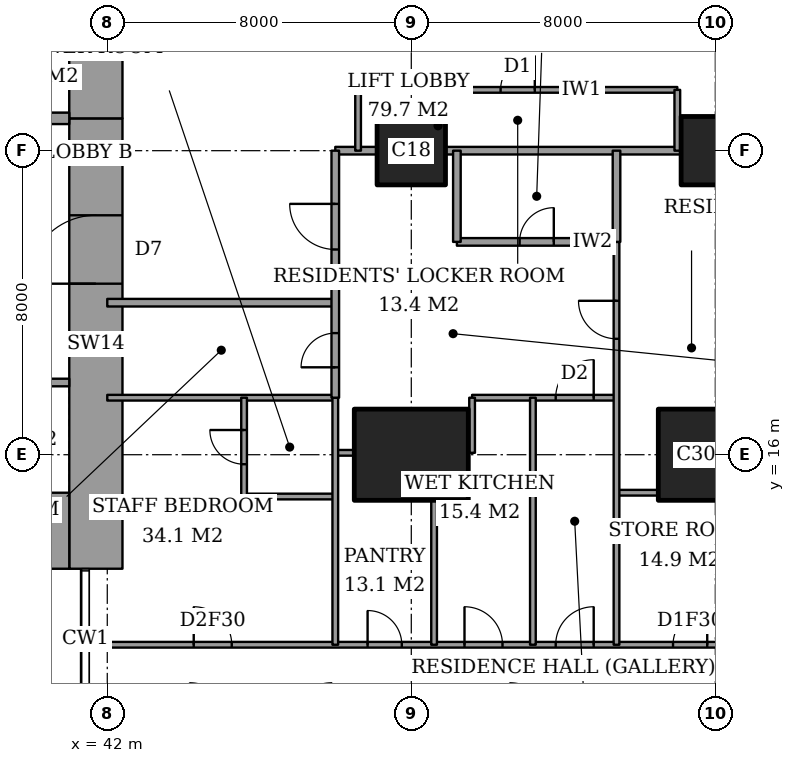
"""IFC4 building model, lengths in metres.
Left out: names, types, materials, properties, quantities, classifications, styles, units other than length and angle.
Written with IfcOpenShell. Run it as: python <this file> out.ifc"""

import sys

from ifc_helpers import new_model, si_unit, direction, frame, frame_2d, origin, origin_2d, place, context, subcontext, project, spatial, rectangle, extrude, element, fill, save


model = new_model("IFC4")
c1 = context("Model", 3, precision=1e-05, world=origin(), true_north=direction((0.0, 1.0)))
c2 = subcontext(c1, "Body", "Model", "MODEL_VIEW")
j1 = project(units=[si_unit("LENGTHUNIT", "METRE"), si_unit("PLANEANGLEUNIT", "RADIAN")], contexts=[c1])
p1 = place(None, origin())
s1 = spatial("IfcSite", under=j1, at=p1, CompositionType="ELEMENT")
p2 = place(p1, origin())
s2 = spatial("IfcBuilding", under=s1, at=p2, CompositionType="ELEMENT")
p3 = place(p2, frame((0.0, 0.0, 218.2)))
s3 = spatial("IfcBuildingStorey", under=s2, at=p3, CompositionType="ELEMENT", Elevation=218.2)
p4 = place(p3, frame((50.0, 16.0, 0.0), z_axis=(0.0, 0.0, 1.0), x_axis=(1.0, 0.0, 0.0)))
e1 = element("IfcColumn", 1, at=p4, inside=s3, PredefinedType="COLUMN", context=c2, shape_type="SweptSolid", body=[
    extrude(rectangle(XDim=3.0, YDim=2.4, at=origin_2d()), origin(), (0.0, 0.0, 1.0), 3.6),
])
p5 = place(p3, frame((50.0, 24.0, 0.0), z_axis=(0.0, 0.0, 1.0), x_axis=(1.0, 0.0, 0.0)))
e2 = element("IfcColumn", 2, at=p5, inside=s3, PredefinedType="COLUMN", context=c2, shape_type="SweptSolid", body=[
    extrude(rectangle(XDim=1.8, YDim=1.8, at=origin_2d()), origin(), (0.0, 0.0, 1.0), 3.6),
])
p6 = place(p3, frame((58.0, 16.0, 0.0), z_axis=(0.0, 0.0, 1.0), x_axis=(1.0, 0.0, 0.0)))
e3 = element("IfcColumn", 3, at=p6, inside=s3, PredefinedType="COLUMN", context=c2, shape_type="SweptSolid", body=[
    extrude(rectangle(XDim=3.0, YDim=2.4, at=origin_2d()), origin(), (0.0, 0.0, 1.0), 3.6),
])
p7 = place(p3, frame((58.0, 24.0, 0.0), z_axis=(0.0, 0.0, 1.0), x_axis=(1.0, 0.0, 0.0)))
e4 = element("IfcColumn", 4, at=p7, inside=s3, PredefinedType="COLUMN", context=c2, shape_type="SweptSolid", body=[
    extrude(rectangle(XDim=1.8, YDim=1.8, at=origin_2d()), origin(), (0.0, 0.0, 1.0), 3.6),
])
p8 = place(p3, frame((37.85, 14.0, 0.0), z_axis=(0.0, 0.0, 1.0), x_axis=(1.0, 0.0, 0.0)))
e5 = element("IfcWall", 5, at=p8, inside=s3, PredefinedType="SHEAR", context=c2, shape_type="SweptSolid", body=[
    extrude(rectangle(XDim=3.15, YDim=2.0, at=frame_2d((1.575, 0.0))), origin(), (0.0, 0.0, 1.0), 3.6),
])
p9 = place(p3, frame((41.7, 13.0, 0.0), z_axis=(0.0, 0.0, 1.0), x_axis=(0.0, 1.0, 0.0)))
e6 = element("IfcWall", 6, at=p9, inside=s3, PredefinedType="SHEAR", context=c2, shape_type="SweptSolid", body=[
    extrude(rectangle(XDim=11.85, YDim=1.4, at=frame_2d((5.925, 0.0))), origin(), (0.0, 0.0, 1.0), 3.6),
])
p10 = place(p9, frame((7.5, 0.0, 0.0)))
e7 = element("IfcOpeningElement", 7, at=p10, cuts=e6, PredefinedType="OPENING", context=c2, shape_type="SweptSolid", body=[
    extrude(rectangle(XDim=1.8, YDim=2.4, at=frame_2d((0.9, 1.2))), frame((0.0, 0.71, 0.0), z_axis=(0.0, -1.0, 0.0), x_axis=(1.0, 0.0, 0.0)), (0.0, 0.0, 1.0), 1.42),
])
p11 = place(p3, frame((41.7, 24.85, 0.0), z_axis=(0.0, 0.0, 1.0), x_axis=(0.0, 1.0, 0.0)))
e8 = element("IfcWall", 8, at=p11, inside=s3, PredefinedType="SHEAR", context=c2, shape_type="SweptSolid", body=[
    extrude(rectangle(XDim=10.15, YDim=1.4, at=frame_2d((5.075, 0.0))), origin(), (0.0, 0.0, 1.0), 3.6),
])
p12 = place(p3, frame((37.85, 24.85, 0.0), z_axis=(0.0, 0.0, 1.0), x_axis=(1.0, 0.0, 0.0)))
e9 = element("IfcWall", 9, at=p12, inside=s3, PredefinedType="SHEAR", context=c2, shape_type="SweptSolid", body=[
    extrude(rectangle(XDim=3.15, YDim=0.3, at=frame_2d((1.575, 0.0))), origin(), (0.0, 0.0, 1.0), 3.6),
])
p13 = place(p12, frame((0.65, 0.0, 0.0)))
e10 = element("IfcOpeningElement", 10, at=p13, cuts=e9, PredefinedType="OPENING", context=c2, shape_type="SweptSolid", body=[
    extrude(rectangle(XDim=1.6, YDim=2.1, at=frame_2d((0.8, 1.05))), frame((0.0, 0.16, 0.0), z_axis=(0.0, -1.0, 0.0), x_axis=(1.0, 0.0, 0.0)), (0.0, 0.0, 1.0), 0.32),
])
p14 = place(p3, frame((41.439, 11.0, 0.0), z_axis=(0.0, 0.0, 1.0), x_axis=(1.0, 0.0, 0.0)))
e11 = element("IfcWall", 11, at=p14, inside=s3, PredefinedType="PARTITIONING", context=c2, shape_type="SweptSolid", body=[
    extrude(rectangle(XDim=25.011, YDim=0.15, at=frame_2d((12.505, 0.0))), origin(), (0.0, 0.0, 1.0), 3.35),
])
p15 = place(p14, frame((12.361, 0.0, 0.0)))
e12 = element("IfcOpeningElement", 12, at=p15, cuts=e11, PredefinedType="OPENING", context=c2, shape_type="SweptSolid", body=[
    extrude(rectangle(XDim=1.0, YDim=2.1, at=frame_2d((0.5, 1.05))), frame((0.0, 0.085, 0.0), z_axis=(0.0, -1.0, 0.0), x_axis=(1.0, 0.0, 0.0)), (0.0, 0.0, 1.0), 0.17),
])
p16 = place(p14, frame((20.924, 0.0, 0.0)))
e13 = element("IfcOpeningElement", 13, at=p16, cuts=e11, PredefinedType="OPENING", context=c2, shape_type="SweptSolid", body=[
    extrude(rectangle(XDim=1.0, YDim=2.1, at=frame_2d((0.5, 1.05))), frame((0.0, 0.085, 0.0), z_axis=(0.0, -1.0, 0.0), x_axis=(1.0, 0.0, 0.0)), (0.0, 0.0, 1.0), 0.17),
])
p17 = place(p14, frame((15.448, 0.0, 0.0)))
e14 = element("IfcOpeningElement", 14, at=p17, cuts=e11, PredefinedType="OPENING", context=c2, shape_type="SweptSolid", body=[
    extrude(rectangle(XDim=0.9, YDim=2.1, at=frame_2d((0.45, 1.05))), frame((0.0, 0.085, 0.0), z_axis=(0.0, -1.0, 0.0), x_axis=(1.0, 0.0, 0.0)), (0.0, 0.0, 1.0), 0.17),
])
p18 = place(p14, frame((9.961, 0.0, 0.0)))
e15 = element("IfcOpeningElement", 15, at=p18, cuts=e11, PredefinedType="OPENING", context=c2, shape_type="SweptSolid", body=[
    extrude(rectangle(XDim=1.0, YDim=2.1, at=frame_2d((0.5, 1.05))), frame((0.0, 0.085, 0.0), z_axis=(0.0, -1.0, 0.0), x_axis=(1.0, 0.0, 0.0)), (0.0, 0.0, 1.0), 0.17),
])
p19 = place(p14, frame((7.411, 0.0, 0.0)))
e16 = element("IfcOpeningElement", 16, at=p19, cuts=e11, PredefinedType="OPENING", context=c2, shape_type="SweptSolid", body=[
    extrude(rectangle(XDim=0.9, YDim=2.1, at=frame_2d((0.45, 1.05))), frame((0.0, 0.085, 0.0), z_axis=(0.0, -1.0, 0.0), x_axis=(1.0, 0.0, 0.0)), (0.0, 0.0, 1.0), 0.17),
])
p20 = place(p14, frame((2.836, 0.0, 0.0)))
e17 = element("IfcOpeningElement", 17, at=p20, cuts=e11, PredefinedType="OPENING", context=c2, shape_type="SweptSolid", body=[
    extrude(rectangle(XDim=1.0, YDim=2.1, at=frame_2d((0.5, 1.05))), frame((0.0, 0.085, 0.0), z_axis=(0.0, -1.0, 0.0), x_axis=(1.0, 0.0, 0.0)), (0.0, 0.0, 1.0), 0.17),
])
p21 = place(p3, frame((45.6, 14.9, 0.0), z_axis=(0.0, 0.0, 1.0), x_axis=(1.0, 0.0, 0.0)))
e18 = element("IfcWall", 18, at=p21, inside=s3, PredefinedType="PARTITIONING", context=c2, shape_type="SweptSolid", body=[
    extrude(rectangle(XDim=2.4, YDim=0.15, at=frame_2d((1.2, 0.0))), origin(), (0.0, 0.0, 1.0), 3.35),
])
p22 = place(p3, frame((55.4, 15.0, 0.0), z_axis=(0.0, 0.0, 1.0), x_axis=(1.0, 0.0, 0.0)))
e19 = element("IfcWall", 19, at=p22, inside=s3, PredefinedType="PARTITIONING", context=c2, shape_type="SweptSolid", body=[
    extrude(rectangle(XDim=1.1, YDim=0.15, at=frame_2d((0.55, 0.0))), origin(), (0.0, 0.0, 1.0), 3.35),
])
p23 = place(p3, frame((48.0, 16.05, 0.0), z_axis=(0.0, 0.0, 1.0), x_axis=(1.0, 0.0, 0.0)))
e20 = element("IfcWall", 20, at=p23, inside=s3, PredefinedType="PARTITIONING", context=c2, shape_type="SweptSolid", body=[
    extrude(rectangle(XDim=0.5, YDim=0.15, at=frame_2d((0.25, 0.0))), origin(), (0.0, 0.0, 1.0), 2.634),
])
p24 = place(p3, frame((42.0, 17.5, 0.0), z_axis=(0.0, 0.0, 1.0), x_axis=(1.0, 0.0, 0.0)))
e21 = element("IfcWall", 21, at=p24, inside=s3, PredefinedType="PARTITIONING", context=c2, shape_type="SweptSolid", body=[
    extrude(rectangle(XDim=6.0, YDim=0.15, at=frame_2d((3.0, 0.0))), origin(), (0.0, 0.0, 1.0), 3.35),
])
p25 = place(p3, frame((51.6, 17.5, 0.0), z_axis=(0.0, 0.0, 1.0), x_axis=(1.0, 0.0, 0.0)))
e22 = element("IfcWall", 22, at=p25, inside=s3, PredefinedType="PARTITIONING", context=c2, shape_type="SweptSolid", body=[
    extrude(rectangle(XDim=3.8, YDim=0.15, at=frame_2d((1.9, 0.0))), origin(), (0.0, 0.0, 1.0), 3.35),
])
p26 = place(p25, frame((2.2, 0.0, 0.0)))
e23 = element("IfcOpeningElement", 23, at=p26, cuts=e22, PredefinedType="OPENING", context=c2, shape_type="SweptSolid", body=[
    extrude(rectangle(XDim=1.0, YDim=2.1, at=frame_2d((0.5, 1.05))), frame((0.0, 0.085, 0.0), z_axis=(0.0, -1.0, 0.0), x_axis=(1.0, 0.0, 0.0)), (0.0, 0.0, 1.0), 0.17),
])
p27 = place(p3, frame((42.0, 20.0, 0.0), z_axis=(0.0, 0.0, 1.0), x_axis=(1.0, 0.0, 0.0)))
e24 = element("IfcWall", 24, at=p27, inside=s3, PredefinedType="PARTITIONING", context=c2, shape_type="SweptSolid", body=[
    extrude(rectangle(XDim=6.0, YDim=0.2, at=frame_2d((3.0, 0.0))), origin(), (0.0, 0.0, 1.0), 3.35),
])
p28 = place(p3, frame((51.2, 21.6, 0.0), z_axis=(0.0, 0.0, 1.0), x_axis=(1.0, 0.0, 0.0)))
e25 = element("IfcWall", 25, at=p28, inside=s3, PredefinedType="PARTITIONING", context=c2, shape_type="SweptSolid", body=[
    extrude(rectangle(XDim=4.2, YDim=0.2, at=frame_2d((2.1, 0.0))), origin(), (0.0, 0.0, 1.0), 3.35),
])
p29 = place(p28, frame((1.65, 0.0, 0.0)))
e26 = element("IfcOpeningElement", 26, at=p29, cuts=e25, PredefinedType="OPENING", context=c2, shape_type="SweptSolid", body=[
    extrude(rectangle(XDim=0.9, YDim=2.1, at=frame_2d((0.45, 1.05))), frame((0.0, 0.11, 0.0), z_axis=(0.0, -1.0, 0.0), x_axis=(1.0, 0.0, 0.0)), (0.0, 0.0, 1.0), 0.22),
])
p30 = place(p3, frame((48.0, 24.0, 0.0), z_axis=(0.0, 0.0, 1.0), x_axis=(1.0, 0.0, 0.0)))
e27 = element("IfcWall", 27, at=p30, inside=s3, PredefinedType="PARTITIONING", context=c2, shape_type="SweptSolid", body=[
    extrude(rectangle(XDim=1.1, YDim=0.2, at=frame_2d((0.55, 0.0))), origin(), (0.0, 0.0, 1.0), 3.35),
])
p31 = place(p3, frame((50.9, 24.0, 0.0), z_axis=(0.0, 0.0, 1.0), x_axis=(1.0, 0.0, 0.0)))
e28 = element("IfcWall", 28, at=p31, inside=s3, PredefinedType="PARTITIONING", context=c2, shape_type="SweptSolid", body=[
    extrude(rectangle(XDim=6.2, YDim=0.2, at=frame_2d((3.1, 0.0))), origin(), (0.0, 0.0, 1.0), 3.35),
])
p32 = place(p3, frame((48.6, 25.6, 0.0), z_axis=(0.0, 0.0, 1.0), x_axis=(1.0, 0.0, 0.0)))
e29 = element("IfcWall", 29, at=p32, inside=s3, PredefinedType="PARTITIONING", context=c2, shape_type="SweptSolid", body=[
    extrude(rectangle(XDim=8.4, YDim=0.15, at=frame_2d((4.2, 0.0))), origin(), (0.0, 0.0, 1.0), 3.35),
])
p33 = place(p32, frame((3.75, 0.0, 0.0)))
e30 = element("IfcOpeningElement", 30, at=p33, cuts=e29, PredefinedType="OPENING", context=c2, shape_type="SweptSolid", body=[
    extrude(rectangle(XDim=0.9, YDim=2.1, at=frame_2d((0.45, 1.05))), frame((0.0, 0.085, 0.0), z_axis=(0.0, -1.0, 0.0), x_axis=(1.0, 0.0, 0.0)), (0.0, 0.0, 1.0), 0.17),
])
p34 = place(p3, frame((45.6, 14.9, 0.0), z_axis=(0.0, 0.0, 1.0), x_axis=(0.0, 1.0, 0.0)))
e31 = element("IfcWall", 31, at=p34, inside=s3, PredefinedType="PARTITIONING", context=c2, shape_type="SweptSolid", body=[
    extrude(rectangle(XDim=2.6, YDim=0.15, at=frame_2d((1.3, 0.0))), origin(), (0.0, 0.0, 1.0), 3.35),
])
p35 = place(p34, frame((0.85, 0.0, 0.0)))
e32 = element("IfcOpeningElement", 32, at=p35, cuts=e31, PredefinedType="OPENING", context=c2, shape_type="SweptSolid", body=[
    extrude(rectangle(XDim=0.9, YDim=2.1, at=frame_2d((0.45, 1.05))), frame((0.0, 0.085, 0.0), z_axis=(0.0, -1.0, 0.0), x_axis=(1.0, 0.0, 0.0)), (0.0, 0.0, 1.0), 0.17),
])
p36 = place(p3, frame((48.0, 17.5, 0.0), z_axis=(0.0, 0.0, 1.0), x_axis=(0.0, 1.0, 0.0)))
e33 = element("IfcWall", 33, at=p36, inside=s3, PredefinedType="PARTITIONING", context=c2, shape_type="SweptSolid", body=[
    extrude(rectangle(XDim=6.5, YDim=0.2, at=frame_2d((3.25, 0.0))), origin(), (0.0, 0.0, 1.0), 3.35),
])
p37 = place(p36, frame((3.9, 0.0, 0.0)))
e34 = element("IfcOpeningElement", 34, at=p37, cuts=e33, PredefinedType="OPENING", context=c2, shape_type="SweptSolid", body=[
    extrude(rectangle(XDim=1.2, YDim=2.4, at=frame_2d((0.6, 1.2))), frame((0.0, 0.11, 0.0), z_axis=(0.0, -1.0, 0.0), x_axis=(1.0, 0.0, 0.0)), (0.0, 0.0, 1.0), 0.22),
])
p38 = place(p36, frame((0.8, 0.0, 0.0)))
e35 = element("IfcOpeningElement", 35, at=p38, cuts=e33, PredefinedType="OPENING", context=c2, shape_type="SweptSolid", body=[
    extrude(rectangle(XDim=0.9, YDim=2.1, at=frame_2d((0.45, 1.05))), frame((0.0, 0.11, 0.0), z_axis=(0.0, -1.0, 0.0), x_axis=(1.0, 0.0, 0.0)), (0.0, 0.0, 1.0), 0.22),
])
p39 = place(p3, frame((48.0, 11.0, 0.0), z_axis=(0.0, 0.0, 1.0), x_axis=(0.0, 1.0, 0.0)))
e36 = element("IfcWall", 36, at=p39, inside=s3, PredefinedType="PARTITIONING", context=c2, shape_type="SweptSolid", body=[
    extrude(rectangle(XDim=6.5, YDim=0.15, at=frame_2d((3.25, 0.0))), origin(), (0.0, 0.0, 1.0), 3.35),
])
p40 = place(p3, frame((48.6, 24.0, 0.0), z_axis=(0.0, 0.0, 1.0), x_axis=(0.0, 1.0, 0.0)))
e37 = element("IfcWall", 37, at=p40, inside=s3, PredefinedType="PARTITIONING", context=c2, shape_type="SweptSolid", body=[
    extrude(rectangle(XDim=1.6, YDim=0.15, at=frame_2d((0.8, 0.0))), origin(), (0.0, 0.0, 1.0), 3.35),
])
p41 = place(p3, frame((50.6, 11.0, 0.0), z_axis=(0.0, 0.0, 1.0), x_axis=(0.0, 1.0, 0.0)))
e38 = element("IfcWall", 38, at=p41, inside=s3, PredefinedType="PARTITIONING", context=c2, shape_type="SweptSolid", body=[
    extrude(rectangle(XDim=3.8, YDim=0.15, at=frame_2d((1.9, 0.0))), origin(), (0.0, 0.0, 1.0), 3.35),
])
p42 = place(p3, frame((51.2, 21.6, 0.0), z_axis=(0.0, 0.0, 1.0), x_axis=(0.0, 1.0, 0.0)))
e39 = element("IfcWall", 39, at=p42, inside=s3, PredefinedType="PARTITIONING", context=c2, shape_type="SweptSolid", body=[
    extrude(rectangle(XDim=2.4, YDim=0.2, at=frame_2d((1.2, 0.0))), origin(), (0.0, 0.0, 1.0), 3.35),
])
p43 = place(p3, frame((51.6, 16.05, 0.0), z_axis=(0.0, 0.0, 1.0), x_axis=(0.0, 1.0, 0.0)))
e40 = element("IfcWall", 40, at=p43, inside=s3, PredefinedType="PARTITIONING", context=c2, shape_type="SweptSolid", body=[
    extrude(rectangle(XDim=1.45, YDim=0.15, at=frame_2d((0.725, 0.0))), origin(), (0.0, 0.0, 1.0), 3.35),
])
p44 = place(p3, frame((53.2, 11.0, 0.0), z_axis=(0.0, 0.0, 1.0), x_axis=(0.0, 1.0, 0.0)))
e41 = element("IfcWall", 41, at=p44, inside=s3, PredefinedType="PARTITIONING", context=c2, shape_type="SweptSolid", body=[
    extrude(rectangle(XDim=6.5, YDim=0.15, at=frame_2d((3.25, 0.0))), origin(), (0.0, 0.0, 1.0), 3.35),
])
p45 = place(p3, frame((55.4, 21.6, 0.0), z_axis=(0.0, 0.0, 1.0), x_axis=(0.0, 1.0, 0.0)))
e42 = element("IfcWall", 42, at=p45, inside=s3, PredefinedType="PARTITIONING", context=c2, shape_type="SweptSolid", body=[
    extrude(rectangle(XDim=2.4, YDim=0.2, at=frame_2d((1.2, 0.0))), origin(), (0.0, 0.0, 1.0), 3.35),
])
p46 = place(p3, frame((55.4, 11.0, 0.0), z_axis=(0.0, 0.0, 1.0), x_axis=(0.0, 1.0, 0.0)))
e43 = element("IfcWall", 43, at=p46, inside=s3, PredefinedType="PARTITIONING", context=c2, shape_type="SweptSolid", body=[
    extrude(rectangle(XDim=10.6, YDim=0.15, at=frame_2d((5.3, 0.0))), origin(), (0.0, 0.0, 1.0), 3.35),
])
p47 = place(p46, frame((8.05, 0.0, 0.0)))
e44 = element("IfcOpeningElement", 44, at=p47, cuts=e43, PredefinedType="OPENING", context=c2, shape_type="SweptSolid", body=[
    extrude(rectangle(XDim=1.0, YDim=2.1, at=frame_2d((0.5, 1.05))), frame((0.0, 0.085, 0.0), z_axis=(0.0, -1.0, 0.0), x_axis=(1.0, 0.0, 0.0)), (0.0, 0.0, 1.0), 0.17),
])
p48 = place(p3, frame((57.0, 24.0, 0.0), z_axis=(0.0, 0.0, 1.0), x_axis=(0.0, 1.0, 0.0)))
e45 = element("IfcWall", 45, at=p48, inside=s3, PredefinedType="PARTITIONING", context=c2, shape_type="SweptSolid", body=[
    extrude(rectangle(XDim=1.6, YDim=0.15, at=frame_2d((0.8, 0.0))), origin(), (0.0, 0.0, 1.0), 3.35),
])
p49 = place(p3, frame((28.3, 17.9, 0.0), z_axis=(0.0, 0.0, 1.0), x_axis=(1.0, 0.0, 0.0)))
e46 = element("IfcWall", 46, at=p49, inside=s3, PredefinedType="PARTITIONING", context=c2, shape_type="SweptSolid", body=[
    extrude(rectangle(XDim=12.7, YDim=0.2, at=frame_2d((6.35, 0.0))), origin(), (0.0, 0.0, 1.0), 3.6),
])
p50 = place(p49, frame((1.05, 0.0, 0.0)))
e47 = element("IfcOpeningElement", 47, at=p50, cuts=e46, PredefinedType="OPENING", context=c2, shape_type="SweptSolid", body=[
    extrude(rectangle(XDim=0.9, YDim=2.1, at=frame_2d((0.45, 1.05))), frame((0.0, 0.11, 0.0), z_axis=(0.0, -1.0, 0.0), x_axis=(1.0, 0.0, 0.0)), (0.0, 0.0, 1.0), 0.22),
])
p51 = place(p49, frame((7.45, 0.0, 0.0)))
e48 = element("IfcOpeningElement", 48, at=p51, cuts=e46, PredefinedType="OPENING", context=c2, shape_type="SweptSolid", body=[
    extrude(rectangle(XDim=0.9, YDim=2.1, at=frame_2d((0.45, 1.05))), frame((0.0, 0.11, 0.0), z_axis=(0.0, -1.0, 0.0), x_axis=(1.0, 0.0, 0.0)), (0.0, 0.0, 1.0), 0.22),
])
p52 = place(p49, frame((10.6, 0.0, 0.0)))
e49 = element("IfcOpeningElement", 49, at=p52, cuts=e46, PredefinedType="OPENING", context=c2, shape_type="SweptSolid", body=[
    extrude(rectangle(XDim=1.2, YDim=2.1, at=frame_2d((0.6, 1.05))), frame((0.0, 0.11, 0.0), z_axis=(0.0, -1.0, 0.0), x_axis=(1.0, 0.0, 0.0)), (0.0, 0.0, 1.0), 0.22),
])
p53 = place(p15, origin())
e50 = element("IfcDoor", 50, at=p53, inside=s3, OperationType="SINGLE_SWING_LEFT", PredefinedType="DOOR", context=c2, shape_type="SweptSolid", body=[
    extrude(rectangle(XDim=1.0, YDim=2.1, at=frame_2d((0.5, 1.05))), frame((0.0, 0.025, 0.0), z_axis=(0.0, -1.0, 0.0), x_axis=(1.0, 0.0, 0.0)), (0.0, 0.0, 1.0), 0.05),
])
fill(e12, e50)
p54 = place(p17, origin())
e51 = element("IfcDoor", 51, at=p54, inside=s3, OperationType="SINGLE_SWING_LEFT", PredefinedType="DOOR", context=c2, shape_type="SweptSolid", body=[
    extrude(rectangle(XDim=0.9, YDim=2.1, at=frame_2d((0.45, 1.05))), frame((0.0, 0.025, 0.0), z_axis=(0.0, -1.0, 0.0), x_axis=(1.0, 0.0, 0.0)), (0.0, 0.0, 1.0), 0.05),
])
fill(e14, e51)
p55 = place(p47, origin())
e52 = element("IfcDoor", 52, at=p55, inside=s3, OperationType="SINGLE_SWING_LEFT", PredefinedType="DOOR", context=c2, shape_type="SweptSolid", body=[
    extrude(rectangle(XDim=1.0, YDim=2.1, at=frame_2d((0.5, 1.05))), frame((0.0, 0.025, 0.0), z_axis=(0.0, -1.0, 0.0), x_axis=(1.0, 0.0, 0.0)), (0.0, 0.0, 1.0), 0.05),
])
fill(e44, e52)
p56 = place(p29, origin())
e53 = element("IfcDoor", 53, at=p56, inside=s3, OperationType="SINGLE_SWING_LEFT", PredefinedType="DOOR", context=c2, shape_type="SweptSolid", body=[
    extrude(rectangle(XDim=0.9, YDim=2.1, at=frame_2d((0.45, 1.05))), frame((0.0, 0.025, 0.0), z_axis=(0.0, -1.0, 0.0), x_axis=(1.0, 0.0, 0.0)), (0.0, 0.0, 1.0), 0.05),
])
fill(e26, e53)
p57 = place(p37, origin())
e54 = element("IfcDoor", 54, at=p57, inside=s3, OperationType="SINGLE_SWING_LEFT", PredefinedType="DOOR", context=c2, shape_type="SweptSolid", body=[
    extrude(rectangle(XDim=1.2, YDim=2.4, at=frame_2d((0.6, 1.2))), frame((0.0, 0.025, 0.0), z_axis=(0.0, -1.0, 0.0), x_axis=(1.0, 0.0, 0.0)), (0.0, 0.0, 1.0), 0.05),
])
fill(e34, e54)
p58 = place(p26, origin())
e55 = element("IfcDoor", 55, at=p58, inside=s3, OperationType="SINGLE_SWING_LEFT", PredefinedType="DOOR", context=c2, shape_type="SweptSolid", body=[
    extrude(rectangle(XDim=1.0, YDim=2.1, at=frame_2d((0.5, 1.05))), frame((0.0, 0.025, 0.0), z_axis=(0.0, -1.0, 0.0), x_axis=(1.0, 0.0, 0.0)), (0.0, 0.0, 1.0), 0.05),
])
fill(e23, e55)
p59 = place(p18, origin())
e56 = element("IfcDoor", 56, at=p59, inside=s3, OperationType="SINGLE_SWING_RIGHT", PredefinedType="DOOR", context=c2, shape_type="SweptSolid", body=[
    extrude(rectangle(XDim=1.0, YDim=2.1, at=frame_2d((0.5, 1.05))), frame((0.0, 0.025, 0.0), z_axis=(0.0, -1.0, 0.0), x_axis=(1.0, 0.0, 0.0)), (0.0, 0.0, 1.0), 0.05),
])
fill(e15, e56)
p60 = place(p19, origin())
e57 = element("IfcDoor", 57, at=p60, inside=s3, OperationType="SINGLE_SWING_RIGHT", PredefinedType="DOOR", context=c2, shape_type="SweptSolid", body=[
    extrude(rectangle(XDim=0.9, YDim=2.1, at=frame_2d((0.45, 1.05))), frame((0.0, 0.025, 0.0), z_axis=(0.0, -1.0, 0.0), x_axis=(1.0, 0.0, 0.0)), (0.0, 0.0, 1.0), 0.05),
])
fill(e16, e57)
p61 = place(p35, origin())
e58 = element("IfcDoor", 58, at=p61, inside=s3, OperationType="SINGLE_SWING_LEFT", PredefinedType="DOOR", context=c2, shape_type="SweptSolid", body=[
    extrude(rectangle(XDim=0.9, YDim=2.1, at=frame_2d((0.45, 1.05))), frame((0.0, 0.025, 0.0), z_axis=(0.0, -1.0, 0.0), x_axis=(1.0, 0.0, 0.0)), (0.0, 0.0, 1.0), 0.05),
])
fill(e32, e58)
p62 = place(p20, origin())
e59 = element("IfcDoor", 59, at=p62, inside=s3, OperationType="SINGLE_SWING_RIGHT", PredefinedType="DOOR", context=c2, shape_type="SweptSolid", body=[
    extrude(rectangle(XDim=1.0, YDim=2.1, at=frame_2d((0.5, 1.05))), frame((0.0, 0.025, 0.0), z_axis=(0.0, -1.0, 0.0), x_axis=(1.0, 0.0, 0.0)), (0.0, 0.0, 1.0), 0.05),
])
fill(e17, e59)
p63 = place(p38, origin())
e60 = element("IfcDoor", 60, at=p63, inside=s3, OperationType="SINGLE_SWING_RIGHT", PredefinedType="DOOR", context=c2, shape_type="SweptSolid", body=[
    extrude(rectangle(XDim=0.9, YDim=2.1, at=frame_2d((0.45, 1.05))), frame((0.0, 0.025, 0.0), z_axis=(0.0, -1.0, 0.0), x_axis=(1.0, 0.0, 0.0)), (0.0, 0.0, 1.0), 0.05),
])
fill(e35, e60)
p64 = place(p33, origin())
e61 = element("IfcDoor", 61, at=p64, inside=s3, OperationType="SINGLE_SWING_LEFT", PredefinedType="DOOR", context=c2, shape_type="SweptSolid", body=[
    extrude(rectangle(XDim=0.9, YDim=2.1, at=frame_2d((0.45, 1.05))), frame((0.0, 0.025, 0.0), z_axis=(0.0, -1.0, 0.0), x_axis=(1.0, 0.0, 0.0)), (0.0, 0.0, 1.0), 0.05),
])
fill(e30, e61)
p65 = place(p10, origin())
e62 = element("IfcDoor", 62, at=p65, inside=s3, OperationType="DOUBLE_DOOR_DOUBLE_SWING", PredefinedType="DOOR", context=c2, shape_type="SweptSolid", body=[
    extrude(rectangle(XDim=1.8, YDim=2.4, at=frame_2d((0.9, 1.2))), frame((0.0, 0.025, 0.0), z_axis=(0.0, -1.0, 0.0), x_axis=(1.0, 0.0, 0.0)), (0.0, 0.0, 1.0), 0.05),
])
fill(e7, e62)
save(model, sys.argv[1])
